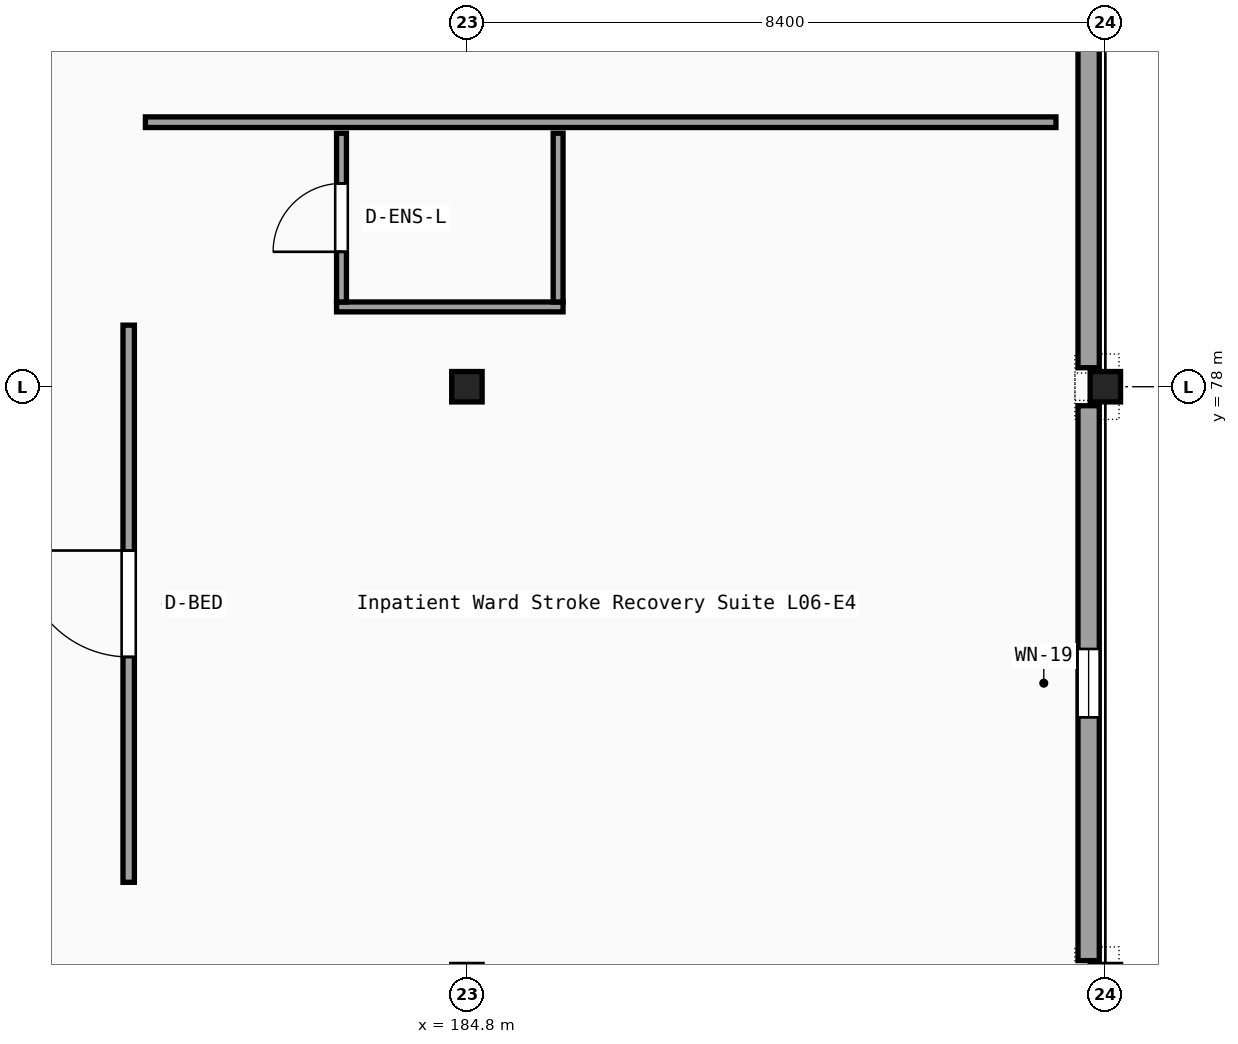
"""IFC4 building model, lengths in metres.
Left out: names, types, materials, properties, quantities, classifications, styles, units other than length and angle.
Written with IfcOpenShell. Run it as: python <this file> out.ifc"""

import sys

from ifc_helpers import new_model, si_unit, direction, frame, frame_2d, origin, origin_2d, place, context, subcontext, project, spatial, rectangle, i_section, extrude, element, fill, save


model = new_model("IFC4")
c1 = context("Model", 3, precision=1e-05, world=origin(), true_north=direction((0.0, 1.0)))
c2 = subcontext(c1, "Body", "Model", "MODEL_VIEW")
j1 = project(units=[si_unit("LENGTHUNIT", "METRE"), si_unit("PLANEANGLEUNIT", "RADIAN")], contexts=[c1])
p1 = place(None, origin())
s1 = spatial("IfcSite", under=j1, at=p1, CompositionType="ELEMENT")
p2 = place(p1, origin())
s2 = spatial("IfcBuilding", under=s1, at=p2, CompositionType="ELEMENT")
p3 = place(p2, frame((0.0, 0.0, 27.0)))
s3 = spatial("IfcBuildingStorey", under=s2, at=p3, CompositionType="ELEMENT", Elevation=27.0)
for number, where, z_axis, x_axis in (
    (1, (184.8, 78.0, 0.0), (0.0, 0.0, 1.0), (1.0, 0.0, 0.0)),
    (2, (193.2, 78.0, 0.0), (0.0, 0.0, 1.0), (1.0, 0.0, 0.0)),
):
    element("IfcColumn", number, at=place(p3, frame(where, z_axis=z_axis, x_axis=x_axis)), inside=s3, PredefinedType="COLUMN", context=c2, shape_type="SweptSolid", body=[
        extrude(i_section(OverallWidth=0.3, OverallDepth=0.4, WebThickness=0.013, FlangeThickness=0.024, FilletRadius=0.027, at=origin_2d()), origin(), (0.0, 0.0, 1.0), 4.05),
    ])
p4 = place(p3, frame((192.98, 70.45, 0.0), z_axis=(0.0, 0.0, 1.0), x_axis=(0.0, 1.0, 0.0)))
e3 = element("IfcWall", 3, at=p4, inside=s3, PredefinedType="SOLIDWALL", context=c2, shape_type="SweptSolid", body=[
    extrude(rectangle(XDim=7.3, YDim=0.28, at=frame_2d((3.65, 0.0))), origin(), (0.0, 0.0, 1.0), 3.26),
])
p5 = place(p4, frame((3.2, 0.0, 0.9)))
e4 = element("IfcOpeningElement", 4, at=p5, cuts=e3, PredefinedType="OPENING", context=c2, shape_type="SweptSolid", body=[
    extrude(rectangle(XDim=0.9, YDim=1.8, at=frame_2d((0.45, 0.9))), frame((0.0, 0.15, 0.0), z_axis=(0.0, -1.0, 0.0), x_axis=(1.0, 0.0, 0.0)), (0.0, 0.0, 1.0), 0.3),
])
p6 = place(p3, frame((192.98, 78.25, 0.0), z_axis=(0.0, 0.0, 1.0), x_axis=(0.0, 1.0, 0.0)))
e5 = element("IfcWall", 5, at=p6, inside=s3, PredefinedType="SOLIDWALL", context=c2, shape_type="SweptSolid", body=[
    extrude(rectangle(XDim=7.3, YDim=0.28, at=frame_2d((3.65, 0.0))), origin(), (0.0, 0.0, 1.0), 3.26),
])
p7 = place(p3, frame((180.35, 71.48, 0.0), z_axis=(0.0, 0.0, 1.0), x_axis=(0.0, 1.0, 0.0)))
e6 = element("IfcWall", 6, at=p7, inside=s3, PredefinedType="PARTITIONING", context=c2, shape_type="SweptSolid", body=[
    extrude(rectangle(XDim=7.33, YDim=0.15, at=frame_2d((3.665, 0.0))), origin(), (0.0, 0.0, 1.0), 3.26),
])
p8 = place(p7, frame((2.965, 0.0, 0.0)))
e7 = element("IfcOpeningElement", 7, at=p8, cuts=e6, PredefinedType="OPENING", context=c2, shape_type="SweptSolid", body=[
    extrude(rectangle(XDim=1.4, YDim=2.2, at=frame_2d((0.7, 1.1))), frame((0.0, 0.085, 0.0), z_axis=(0.0, -1.0, 0.0), x_axis=(1.0, 0.0, 0.0)), (0.0, 0.0, 1.0), 0.17),
])
p9 = place(p3, frame((180.57, 81.48, 0.0), z_axis=(0.0, 0.0, 1.0), x_axis=(1.0, 0.0, 0.0)))
e8 = element("IfcWall", 8, at=p9, inside=s3, PredefinedType="PARTITIONING", context=c2, shape_type="SweptSolid", body=[
    extrude(rectangle(XDim=11.98, YDim=0.14, at=frame_2d((5.99, 0.0))), origin(), (0.0, 0.0, 1.0), 3.54),
])
p10 = place(p3, frame((183.085, 79.05, 0.0), z_axis=(0.0, 0.0, 1.0), x_axis=(1.0, 0.0, 0.0)))
e9 = element("IfcWall", 9, at=p10, inside=s3, PredefinedType="PARTITIONING", context=c2, shape_type="SweptSolid", body=[
    extrude(rectangle(XDim=2.98, YDim=0.13, at=frame_2d((1.49, 0.0))), origin(), (0.0, 0.0, 1.0), 3.54),
])
p11 = place(p3, frame((183.15, 79.115, 0.0), z_axis=(0.0, 0.0, 1.0), x_axis=(0.0, 1.0, 0.0)))
e10 = element("IfcWall", 10, at=p11, inside=s3, PredefinedType="PARTITIONING", context=c2, shape_type="SweptSolid", body=[
    extrude(rectangle(XDim=2.22, YDim=0.13, at=frame_2d((1.11, 0.0))), origin(), (0.0, 0.0, 1.0), 3.77),
])
p12 = place(p11, frame((0.66, 0.0, 0.0)))
e11 = element("IfcOpeningElement", 11, at=p12, cuts=e10, PredefinedType="OPENING", context=c2, shape_type="SweptSolid", body=[
    extrude(rectangle(XDim=0.9, YDim=2.1, at=frame_2d((0.45, 1.05))), frame((0.0, 0.075, 0.0), z_axis=(0.0, -1.0, 0.0), x_axis=(1.0, 0.0, 0.0)), (0.0, 0.0, 1.0), 0.15),
])
p13 = place(p3, frame((186.0, 79.115, 0.0), z_axis=(0.0, 0.0, 1.0), x_axis=(0.0, 1.0, 0.0)))
e12 = element("IfcWall", 12, at=p13, inside=s3, PredefinedType="PARTITIONING", context=c2, shape_type="SweptSolid", body=[
    extrude(rectangle(XDim=2.22, YDim=0.13, at=frame_2d((1.11, 0.0))), origin(), (0.0, 0.0, 1.0), 3.77),
])
p14 = place(p5, origin())
e13 = element("IfcWindow", 13, at=p14, inside=s3, PartitioningType="SINGLE_PANEL", PredefinedType="WINDOW", context=c2, shape_type="SweptSolid", body=[
    extrude(rectangle(XDim=0.9, YDim=1.8, at=frame_2d((0.45, 0.9))), frame((0.0, 0.03, 0.0), z_axis=(0.0, -1.0, 0.0), x_axis=(1.0, 0.0, 0.0)), (0.0, 0.0, 1.0), 0.06),
])
fill(e4, e13)
p15 = place(p8, origin())
e14 = element("IfcDoor", 14, at=p15, inside=s3, OperationType="SINGLE_SWING_RIGHT", PredefinedType="DOOR", context=c2, shape_type="SweptSolid", body=[
    extrude(rectangle(XDim=1.4, YDim=2.2, at=frame_2d((0.7, 1.1))), frame((0.0, 0.025, 0.0), z_axis=(0.0, -1.0, 0.0), x_axis=(1.0, 0.0, 0.0)), (0.0, 0.0, 1.0), 0.05),
])
fill(e7, e14)
p16 = place(p12, origin())
e15 = element("IfcDoor", 15, at=p16, inside=s3, OperationType="SINGLE_SWING_LEFT", PredefinedType="DOOR", context=c2, shape_type="SweptSolid", body=[
    extrude(rectangle(XDim=0.9, YDim=2.1, at=frame_2d((0.45, 1.05))), frame((0.0, 0.025, 0.0), z_axis=(0.0, -1.0, 0.0), x_axis=(1.0, 0.0, 0.0)), (0.0, 0.0, 1.0), 0.05),
])
fill(e11, e15)
save(model, sys.argv[1])
